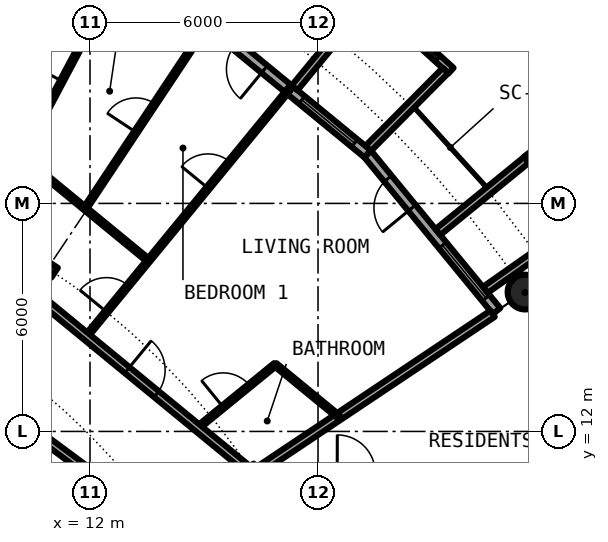
"""IFC4 building model, lengths in metres.
Left out: names, types, materials, properties, quantities, classifications, styles, units other than length and angle.
Written with IfcOpenShell. Run it as: python <this file> out.ifc"""

import sys

from ifc_helpers import new_model, si_unit, direction, frame, frame_2d, origin, origin_2d, place, context, subcontext, project, spatial, rectangle, circle, hollow_circle, i_section, extrude, element, fill, save


model = new_model("IFC4")
c1 = context("Model", 3, precision=1e-05, world=origin(), true_north=direction((0.0, 1.0)))
c2 = subcontext(c1, "Body", "Model", "MODEL_VIEW")
j1 = project(units=[si_unit("LENGTHUNIT", "METRE"), si_unit("PLANEANGLEUNIT", "RADIAN")], contexts=[c1])
p1 = place(None, origin())
s1 = spatial("IfcSite", under=j1, at=p1, CompositionType="ELEMENT")
p2 = place(p1, origin())
s2 = spatial("IfcBuilding", under=s1, at=p2, CompositionType="ELEMENT")
p3 = place(p2, frame((0.0, 0.0, 111.65)))
s3 = spatial("IfcBuildingStorey", under=s2, at=p3, CompositionType="ELEMENT", Elevation=111.65)
p4 = place(p3, frame((23.448, 15.667, 0.0), z_axis=(0.0, 0.0, 1.0), x_axis=(1.0, 0.0, 0.0)))
e1 = element("IfcColumn", 1, at=p4, inside=s3, PredefinedType="COLUMN", context=c2, shape_type="SweptSolid", body=[
    extrude(hollow_circle(Radius=0.457, WallThickness=0.04, at=origin_2d()), origin(), (0.0, 0.0, 1.0), 3.05),
])
p5 = place(p3, frame((10.889, 16.297, 0.0), z_axis=(0.0, 0.0, 1.0), x_axis=(0.55557023302, 0.831469612303, 0.0)))
e2 = element("IfcColumn", 2, at=p5, inside=s3, PredefinedType="COLUMN", context=c2, shape_type="SweptSolid", body=[
    extrude(i_section(OverallWidth=0.307, OverallDepth=0.432, WebThickness=0.021, FlangeThickness=0.04, FilletRadius=0.027, at=origin_2d()), origin(), (0.0, 0.0, 1.0), 3.05),
])
p6 = place(p3, frame((22.699, 15.167, 0.0), z_axis=(0.0, 0.0, 1.0), x_axis=(-0.634382322723, 0.773019449054, 0.0)))
e3 = element("IfcWall", 3, at=p6, inside=s3, PredefinedType="SOLIDWALL", context=c2, shape_type="SweptSolid", body=[
    extrude(rectangle(XDim=5.352, YDim=0.25, at=frame_2d((2.676, 0.0))), origin(), (0.0, 0.0, 1.0), 2.7),
])
p7 = place(p6, frame((0.441, 0.0, 0.3)))
e4 = element("IfcOpeningElement", 4, at=p7, cuts=e3, PredefinedType="OPENING", context=c2, shape_type="SweptSolid", body=[
    extrude(rectangle(XDim=1.8, YDim=2.1, at=frame_2d((0.9, 1.05))), frame((0.0, 0.135, 0.0), z_axis=(0.0, -1.0, 0.0), x_axis=(1.0, 0.0, 0.0)), (0.0, 0.0, 1.0), 0.27),
])
p8 = place(p6, frame((3.51, 0.0, 0.0)))
e5 = element("IfcOpeningElement", 5, at=p8, cuts=e3, PredefinedType="OPENING", context=c2, shape_type="SweptSolid", body=[
    extrude(rectangle(XDim=1.0, YDim=2.2, at=frame_2d((0.5, 1.1))), frame((0.0, 0.135, 0.0), z_axis=(0.0, -1.0, 0.0), x_axis=(1.0, 0.0, 0.0)), (0.0, 0.0, 1.0), 0.27),
])
p9 = place(p3, frame((24.94, 17.382, -0.03), z_axis=(0.0, 0.0, 1.0), x_axis=(-0.603375996329, 0.797456837111, 0.0)))
e6 = element("IfcWall", 6, at=p9, inside=s3, PredefinedType="SOLIDWALL", context=c2, shape_type="SweptSolid", body=[
    extrude(rectangle(XDim=2.391, YDim=0.2, at=frame_2d((1.196, 0.0))), origin(), (0.0, 0.0, 1.0), 2.73),
])
p10 = place(p9, frame((0.156, 0.0, 0.33)))
e7 = element("IfcOpeningElement", 7, at=p10, cuts=e6, PredefinedType="OPENING", context=c2, shape_type="SweptSolid", body=[
    extrude(circle(Radius=1.04, at=frame_2d((1.04, 1.04))), frame((0.0, 0.11, 0.0), z_axis=(0.0, -1.0, 0.0), x_axis=(1.0, 0.0, 0.0)), (0.0, 0.0, 1.0), 0.22),
])
p11 = place(p3, frame((22.402, 15.726, -0.03), z_axis=(0.0, 0.0, 1.0), x_axis=(0.818275399393, 0.574826383135, 0.0)))
e8 = element("IfcWall", 8, at=p11, inside=s3, PredefinedType="SOLIDWALL", context=c2, shape_type="SweptSolid", body=[
    extrude(rectangle(XDim=2.929, YDim=0.2, at=frame_2d((1.465, 0.0))), origin(), (0.0, 0.0, 1.0), 2.73),
])
p12 = place(p3, frame((21.155, 17.246, -0.03), z_axis=(0.0, 0.0, 1.0), x_axis=(0.775179004516, 0.631741648902, 0.0)))
e9 = element("IfcWall", 9, at=p12, inside=s3, PredefinedType="SOLIDWALL", context=c2, shape_type="SweptSolid", body=[
    extrude(rectangle(XDim=3.006, YDim=0.2, at=frame_2d((1.503, 0.0))), origin(), (0.0, 0.0, 1.0), 2.73),
])
p13 = place(p3, frame((19.304, 19.304, 0.0), z_axis=(0.0, 0.0, 1.0), x_axis=(-0.773019449054, 0.634382322723, 0.0)))
e10 = element("IfcWall", 10, at=p13, inside=s3, PredefinedType="SOLIDWALL", context=c2, shape_type="SweptSolid", body=[
    extrude(rectangle(XDim=5.352, YDim=0.25, at=frame_2d((2.676, 0.0))), origin(), (0.0, 0.0, 1.0), 2.7),
])
p14 = place(p13, frame((0.441, 0.0, 0.3)))
e11 = element("IfcOpeningElement", 11, at=p14, cuts=e10, PredefinedType="OPENING", context=c2, shape_type="SweptSolid", body=[
    extrude(rectangle(XDim=1.8, YDim=2.1, at=frame_2d((0.9, 1.05))), frame((0.0, 0.135, 0.0), z_axis=(0.0, -1.0, 0.0), x_axis=(1.0, 0.0, 0.0)), (0.0, 0.0, 1.0), 0.27),
])
p15 = place(p13, frame((3.51, 0.0, 0.0)))
e12 = element("IfcOpeningElement", 12, at=p15, cuts=e10, PredefinedType="OPENING", context=c2, shape_type="SweptSolid", body=[
    extrude(rectangle(XDim=1.0, YDim=2.2, at=frame_2d((0.5, 1.1))), frame((0.0, 0.135, 0.0), z_axis=(0.0, -1.0, 0.0), x_axis=(1.0, 0.0, 0.0)), (0.0, 0.0, 1.0), 0.27),
])
p16 = place(p3, frame((21.5, 21.493, -0.03), z_axis=(0.0, 0.0, 1.0), x_axis=(-0.740998365753, 0.671506829416, 0.0)))
e13 = element("IfcWall", 13, at=p16, inside=s3, PredefinedType="SOLIDWALL", context=c2, shape_type="SweptSolid", body=[
    extrude(rectangle(XDim=2.993, YDim=0.2, at=frame_2d((1.497, 0.0))), origin(), (0.0, 0.0, 1.0), 2.73),
])
p17 = place(p16, frame((0.457, 0.0, 0.33)))
e14 = element("IfcOpeningElement", 14, at=p17, cuts=e13, PredefinedType="OPENING", context=c2, shape_type="SweptSolid", body=[
    extrude(circle(Radius=1.04, at=frame_2d((1.04, 1.04))), frame((0.0, 0.11, 0.0), z_axis=(0.0, -1.0, 0.0), x_axis=(1.0, 0.0, 0.0)), (0.0, 0.0, 1.0), 0.22),
])
p18 = place(p3, frame((19.323, 19.45, -0.03), z_axis=(0.0, 0.0, 1.0), x_axis=(0.704476739375, 0.709727076896, 0.0)))
e15 = element("IfcWall", 15, at=p18, inside=s3, PredefinedType="SOLIDWALL", context=c2, shape_type="SweptSolid", body=[
    extrude(rectangle(XDim=2.883, YDim=0.2, at=frame_2d((1.441, 0.0))), origin(), (0.0, 0.0, 1.0), 2.73),
])
p19 = place(p3, frame((17.384, 21.041, -0.03), z_axis=(0.0, 0.0, 1.0), x_axis=(0.63709551667, 0.770784861449, 0.0)))
e16 = element("IfcWall", 16, at=p19, inside=s3, PredefinedType="SOLIDWALL", context=c2, shape_type="SweptSolid", body=[
    extrude(rectangle(XDim=3.006, YDim=0.2, at=frame_2d((1.503, 0.0))), origin(), (0.0, 0.0, 1.0), 2.73),
])
p20 = place(p3, frame((10.204, 19.233, 0.0), z_axis=(0.0, 0.0, 1.0), x_axis=(0.468610030042, 0.883405139075, 0.0)))
e17 = element("IfcWall", 17, at=p20, inside=s3, PredefinedType="PARTITIONING", context=c2, shape_type="SweptSolid", body=[
    extrude(rectangle(XDim=5.403, YDim=0.1, at=frame_2d((2.702, 0.0))), origin(), (0.0, 0.0, 1.0), 2.7),
])
p21 = place(p20, frame((2.251, 0.0, 0.0)))
e18 = element("IfcOpeningElement", 18, at=p21, cuts=e17, PredefinedType="OPENING", context=c2, shape_type="SweptSolid", body=[
    extrude(rectangle(XDim=0.9, YDim=2.3, at=frame_2d((0.45, 1.15))), frame((0.0, 0.06, 0.0), z_axis=(0.0, -1.0, 0.0), x_axis=(1.0, 0.0, 0.0)), (0.0, 0.0, 1.0), 0.12),
])
p22 = place(p3, frame((11.87, 17.865, 0.0), z_axis=(0.0, 0.0, 1.0), x_axis=(0.553440102418, 0.832888980018, 0.0)))
e19 = element("IfcWall", 19, at=p22, inside=s3, PredefinedType="PARTITIONING", context=c2, shape_type="SweptSolid", body=[
    extrude(rectangle(XDim=5.726, YDim=0.1, at=frame_2d((2.863, 0.0))), origin(), (0.0, 0.0, 1.0), 2.7),
])
p23 = place(p22, frame((2.413, 0.0, 0.0)))
e20 = element("IfcOpeningElement", 20, at=p23, cuts=e19, PredefinedType="OPENING", context=c2, shape_type="SweptSolid", body=[
    extrude(rectangle(XDim=0.9, YDim=2.3, at=frame_2d((0.45, 1.15))), frame((0.0, 0.06, 0.0), z_axis=(0.0, -1.0, 0.0), x_axis=(1.0, 0.0, 0.0)), (0.0, 0.0, 1.0), 0.12),
])
p24 = place(p3, frame((11.9, 14.498, 0.0), z_axis=(0.0, 0.0, 1.0), x_axis=(0.634465454582, 0.772951218993, 0.0)))
e21 = element("IfcWall", 21, at=p24, inside=s3, PredefinedType="PARTITIONING", context=c2, shape_type="SweptSolid", body=[
    extrude(rectangle(XDim=8.42, YDim=0.1, at=frame_2d((4.21, 0.0))), origin(), (0.0, 0.0, 1.0), 2.7),
])
p25 = place(p24, frame((0.84, 0.0, 0.0)))
e22 = element("IfcOpeningElement", 22, at=p25, cuts=e21, PredefinedType="OPENING", context=c2, shape_type="SweptSolid", body=[
    extrude(rectangle(XDim=0.9, YDim=2.3, at=frame_2d((0.45, 1.15))), frame((0.0, 0.06, 0.0), z_axis=(0.0, -1.0, 0.0), x_axis=(1.0, 0.0, 0.0)), (0.0, 0.0, 1.0), 0.12),
])
p26 = place(p24, frame((5.051, 0.0, 0.0)))
e23 = element("IfcOpeningElement", 23, at=p26, cuts=e21, PredefinedType="OPENING", context=c2, shape_type="SweptSolid", body=[
    extrude(rectangle(XDim=0.9, YDim=2.3, at=frame_2d((0.45, 1.15))), frame((0.0, 0.06, 0.0), z_axis=(0.0, -1.0, 0.0), x_axis=(1.0, 0.0, 0.0)), (0.0, 0.0, 1.0), 0.12),
])
p27 = place(p3, frame((14.831, 12.092, 0.0), z_axis=(0.0, 0.0, 1.0), x_axis=(0.774979608522, 0.631986239072, 0.0)))
e24 = element("IfcWall", 24, at=p27, inside=s3, PredefinedType="PARTITIONING", context=c2, shape_type="SweptSolid", body=[
    extrude(rectangle(XDim=2.636, YDim=0.1, at=frame_2d((1.318, 0.0))), origin(), (0.0, 0.0, 1.0), 2.7),
])
p28 = place(p27, frame((0.868, 0.0, 0.0)))
e25 = element("IfcOpeningElement", 25, at=p28, cuts=e24, PredefinedType="OPENING", context=c2, shape_type="SweptSolid", body=[
    extrude(rectangle(XDim=0.9, YDim=2.3, at=frame_2d((0.45, 1.15))), frame((0.0, 0.06, 0.0), z_axis=(0.0, -1.0, 0.0), x_axis=(1.0, 0.0, 0.0)), (0.0, 0.0, 1.0), 0.12),
])
p29 = place(p3, frame((16.477, 11.009, 0.0), z_axis=(0.0, 0.0, 1.0), x_axis=(0.831406593008, 0.555664536482, 0.0)))
e26 = element("IfcWall", 26, at=p29, inside=s3, PredefinedType="PARTITIONING", context=c2, shape_type="SweptSolid", body=[
    extrude(rectangle(XDim=7.358, YDim=0.2, at=frame_2d((3.679, 0.0))), origin(), (0.0, 0.0, 1.0), 2.7),
])
p30 = place(p3, frame((4.906, 16.172, 0.0), z_axis=(0.0, 0.0, 1.0), x_axis=(0.803191461888, -0.595720971219, 0.0)))
e27 = element("IfcWall", 27, at=p30, inside=s3, PredefinedType="PARTITIONING", context=c2, shape_type="SweptSolid", body=[
    extrude(rectangle(XDim=9.76, YDim=0.2, at=frame_2d((4.88, 0.0))), origin(), (0.0, 0.0, 1.0), 2.7),
])
p31 = place(p30, frame((4.38, 0.0, 0.0)))
e28 = element("IfcOpeningElement", 28, at=p31, cuts=e27, PredefinedType="OPENING", context=c2, shape_type="SweptSolid", body=[
    extrude(rectangle(XDim=1.0, YDim=2.3, at=frame_2d((0.5, 1.15))), frame((0.0, 0.11, 0.0), z_axis=(0.0, -1.0, 0.0), x_axis=(1.0, 0.0, 0.0)), (0.0, 0.0, 1.0), 0.22),
])
p32 = place(p3, frame((7.5, 18.108, 0.0), z_axis=(0.0, 0.0, 1.0), x_axis=(0.773049018445, -0.634346289562, 0.0)))
e29 = element("IfcWall", 29, at=p32, inside=s3, PredefinedType="PARTITIONING", context=c2, shape_type="SweptSolid", body=[
    extrude(rectangle(XDim=11.219, YDim=0.2, at=frame_2d((5.61, 0.0))), origin(), (0.0, 0.0, 1.0), 2.39),
])
p33 = place(p32, frame((7.085, 0.0, 0.0)))
e30 = element("IfcOpeningElement", 30, at=p33, cuts=e29, PredefinedType="OPENING", context=c2, shape_type="SweptSolid", body=[
    extrude(rectangle(XDim=1.0, YDim=2.3, at=frame_2d((0.5, 1.15))), frame((0.0, 0.11, 0.0), z_axis=(0.0, -1.0, 0.0), x_axis=(1.0, 0.0, 0.0)), (0.0, 0.0, 1.0), 0.22),
])
p34 = place(p3, frame((8.534, 20.603, 0.0), z_axis=(0.0, 0.0, 1.0), x_axis=(0.773000340237, -0.634405606843, 0.0)))
e31 = element("IfcWall", 31, at=p34, inside=s3, PredefinedType="PARTITIONING", context=c2, shape_type="SweptSolid", body=[
    extrude(rectangle(XDim=6.474, YDim=0.1, at=frame_2d((3.237, 0.0))), origin(), (0.0, 0.0, 1.0), 2.7),
])
p35 = place(p3, frame((16.874, 13.758, 0.0), z_axis=(0.0, 0.0, 1.0), x_axis=(0.772948171844, -0.634469166818, 0.0)))
e32 = element("IfcWall", 32, at=p35, inside=s3, PredefinedType="PARTITIONING", context=c2, shape_type="SweptSolid", body=[
    extrude(rectangle(XDim=2.158, YDim=0.1, at=frame_2d((1.079, 0.0))), origin(), (0.0, 0.0, 1.0), 2.7),
])
p36 = place(p7, origin())
e33 = element("IfcWindow", 33, at=p36, inside=s3, PartitioningType="SINGLE_PANEL", PredefinedType="WINDOW", context=c2, shape_type="SweptSolid", body=[
    extrude(rectangle(XDim=1.8, YDim=2.1, at=frame_2d((0.9, 1.05))), frame((0.0, 0.03, 0.0), z_axis=(0.0, -1.0, 0.0), x_axis=(1.0, 0.0, 0.0)), (0.0, 0.0, 1.0), 0.06),
])
fill(e4, e33)
p37 = place(p8, origin())
e34 = element("IfcDoor", 34, at=p37, inside=s3, OperationType="SINGLE_SWING_LEFT", PredefinedType="DOOR", context=c2, shape_type="SweptSolid", body=[
    extrude(rectangle(XDim=1.0, YDim=2.2, at=frame_2d((0.5, 1.1))), frame((0.0, 0.025, 0.0), z_axis=(0.0, -1.0, 0.0), x_axis=(1.0, 0.0, 0.0)), (0.0, 0.0, 1.0), 0.05),
])
fill(e5, e34)
p38 = place(p14, origin())
e35 = element("IfcWindow", 35, at=p38, inside=s3, PartitioningType="SINGLE_PANEL", PredefinedType="WINDOW", context=c2, shape_type="SweptSolid", body=[
    extrude(rectangle(XDim=1.8, YDim=2.1, at=frame_2d((0.9, 1.05))), frame((0.0, 0.03, 0.0), z_axis=(0.0, -1.0, 0.0), x_axis=(1.0, 0.0, 0.0)), (0.0, 0.0, 1.0), 0.06),
])
fill(e11, e35)
p39 = place(p17, origin())
e36 = element("IfcWindow", 36, at=p39, inside=s3, PartitioningType="SINGLE_PANEL", PredefinedType="WINDOW", context=c2, shape_type="SweptSolid", body=[
    extrude(circle(Radius=1.04, at=frame_2d((1.04, 1.04))), frame((0.0, 0.03, 0.0), z_axis=(0.0, -1.0, 0.0), x_axis=(1.0, 0.0, 0.0)), (0.0, 0.0, 1.0), 0.06),
])
fill(e14, e36)
p40 = place(p15, origin())
e37 = element("IfcDoor", 37, at=p40, inside=s3, OperationType="SINGLE_SWING_LEFT", PredefinedType="DOOR", context=c2, shape_type="SweptSolid", body=[
    extrude(rectangle(XDim=1.0, YDim=2.2, at=frame_2d((0.5, 1.1))), frame((0.0, 0.025, 0.0), z_axis=(0.0, -1.0, 0.0), x_axis=(1.0, 0.0, 0.0)), (0.0, 0.0, 1.0), 0.05),
])
fill(e12, e37)
p41 = place(p33, origin())
e38 = element("IfcDoor", 38, at=p41, inside=s3, OperationType="SINGLE_SWING_RIGHT", PredefinedType="DOOR", context=c2, shape_type="SweptSolid", body=[
    extrude(rectangle(XDim=1.0, YDim=2.3, at=frame_2d((0.5, 1.15))), frame((0.0, 0.025, 0.0), z_axis=(0.0, -1.0, 0.0), x_axis=(1.0, 0.0, 0.0)), (0.0, 0.0, 1.0), 0.05),
])
fill(e30, e38)
p42 = place(p28, origin())
e39 = element("IfcDoor", 39, at=p42, inside=s3, OperationType="SINGLE_SWING_RIGHT", PredefinedType="DOOR", context=c2, shape_type="SweptSolid", body=[
    extrude(rectangle(XDim=0.9, YDim=2.3, at=frame_2d((0.45, 1.15))), frame((0.0, 0.025, 0.0), z_axis=(0.0, -1.0, 0.0), x_axis=(1.0, 0.0, 0.0)), (0.0, 0.0, 1.0), 0.05),
])
fill(e25, e39)
p43 = place(p25, origin())
e40 = element("IfcDoor", 40, at=p43, inside=s3, OperationType="SINGLE_SWING_LEFT", PredefinedType="DOOR", context=c2, shape_type="SweptSolid", body=[
    extrude(rectangle(XDim=0.9, YDim=2.3, at=frame_2d((0.45, 1.15))), frame((0.0, 0.025, 0.0), z_axis=(0.0, -1.0, 0.0), x_axis=(1.0, 0.0, 0.0)), (0.0, 0.0, 1.0), 0.05),
])
fill(e22, e40)
p44 = place(p26, origin())
e41 = element("IfcDoor", 41, at=p44, inside=s3, OperationType="SINGLE_SWING_RIGHT", PredefinedType="DOOR", context=c2, shape_type="SweptSolid", body=[
    extrude(rectangle(XDim=0.9, YDim=2.3, at=frame_2d((0.45, 1.15))), frame((0.0, 0.025, 0.0), z_axis=(0.0, -1.0, 0.0), x_axis=(1.0, 0.0, 0.0)), (0.0, 0.0, 1.0), 0.05),
])
fill(e23, e41)
p45 = place(p23, origin())
e42 = element("IfcDoor", 42, at=p45, inside=s3, OperationType="SINGLE_SWING_LEFT", PredefinedType="DOOR", context=c2, shape_type="SweptSolid", body=[
    extrude(rectangle(XDim=0.9, YDim=2.3, at=frame_2d((0.45, 1.15))), frame((0.0, 0.025, 0.0), z_axis=(0.0, -1.0, 0.0), x_axis=(1.0, 0.0, 0.0)), (0.0, 0.0, 1.0), 0.05),
])
fill(e20, e42)
p46 = place(p21, origin())
e43 = element("IfcDoor", 43, at=p46, inside=s3, OperationType="SINGLE_SWING_LEFT", PredefinedType="DOOR", context=c2, shape_type="SweptSolid", body=[
    extrude(rectangle(XDim=0.9, YDim=2.3, at=frame_2d((0.45, 1.15))), frame((0.0, 0.025, 0.0), z_axis=(0.0, -1.0, 0.0), x_axis=(1.0, 0.0, 0.0)), (0.0, 0.0, 1.0), 0.05),
])
fill(e18, e43)
save(model, sys.argv[1])
